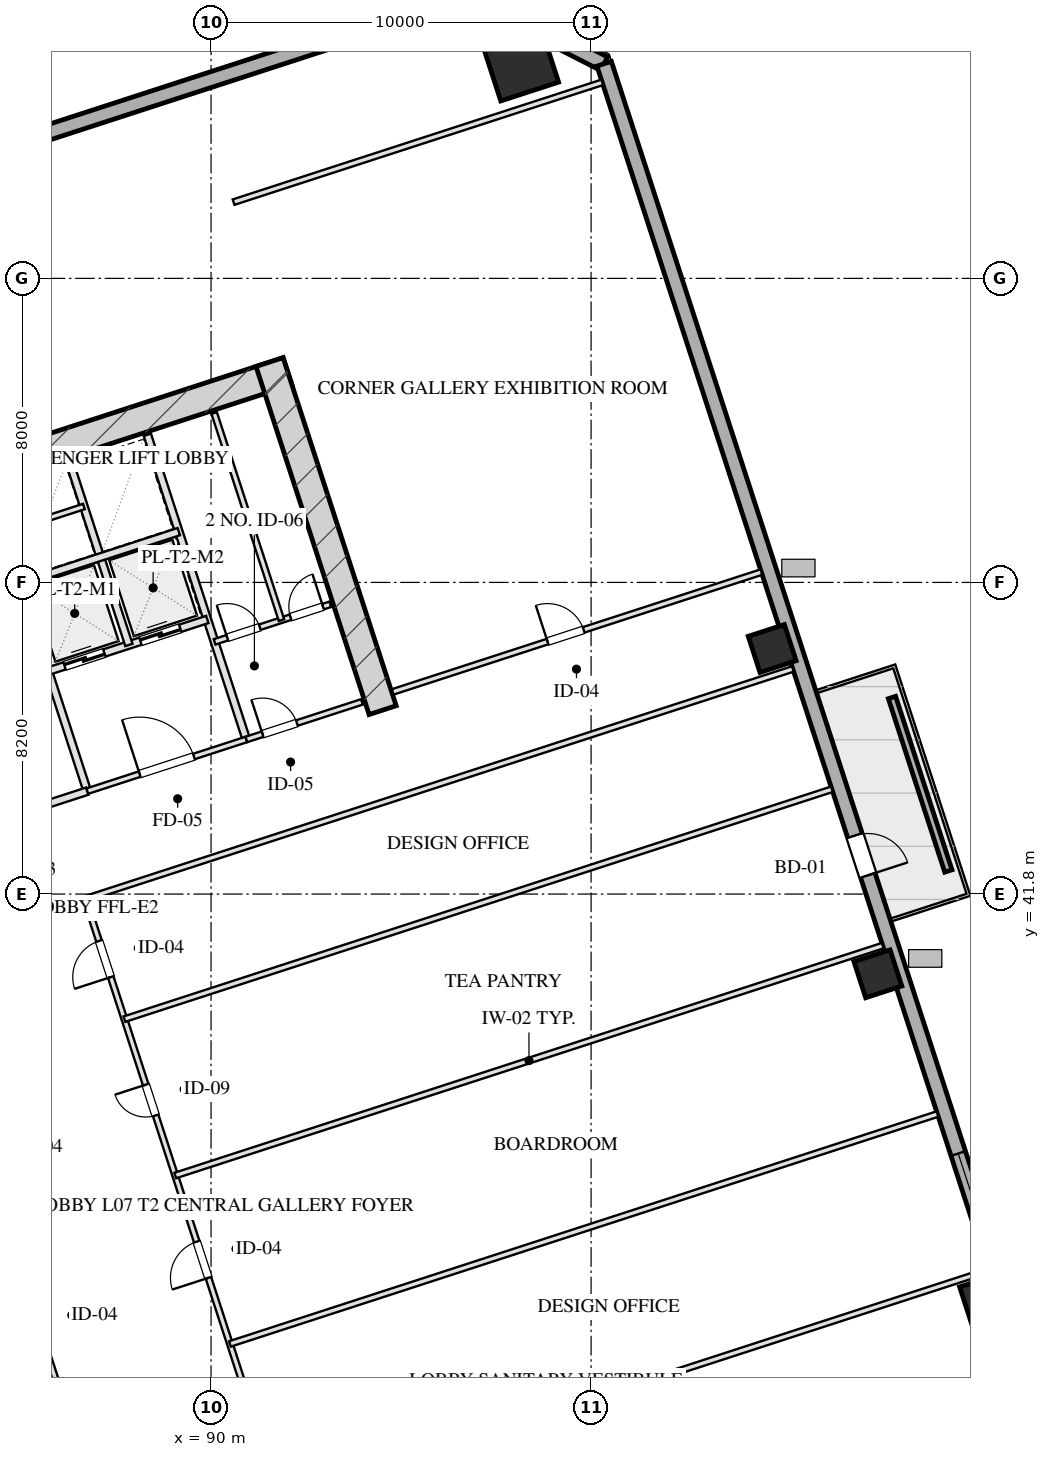
"""IFC4 building model, lengths in metres.
Left out: names, types, materials, properties, quantities, classifications, styles, units other than length and angle.
Written with IfcOpenShell. Run it as: python <this file> out.ifc"""

import sys

from ifc_helpers import new_model, si_unit, direction, frame, frame_2d, origin, origin_2d, place, context, subcontext, project, spatial, rectangle, hollow_rectangle, extrude, element, fill, save


model = new_model("IFC4")
c1 = context("Model", 3, precision=1e-05, world=origin(), true_north=direction((0.0, 1.0)))
c2 = subcontext(c1, "Body", "Model", "MODEL_VIEW")
j1 = project(units=[si_unit("LENGTHUNIT", "METRE"), si_unit("PLANEANGLEUNIT", "RADIAN")], contexts=[c1])
p1 = place(None, origin())
s1 = spatial("IfcSite", under=j1, at=p1, CompositionType="ELEMENT")
p2 = place(p1, origin())
s2 = spatial("IfcBuilding", under=s1, at=p2, CompositionType="ELEMENT")
p3 = place(p2, frame((0.0, 0.0, 34.0)))
s3 = spatial("IfcBuildingStorey", under=s2, at=p3, CompositionType="ELEMENT", Elevation=34.0)
p4 = place(p3, frame((76.272, 50.443, 0.0), z_axis=(0.0, 0.0, 1.0), x_axis=(0.951056072937, 0.309018358888, 0.0)))
e1 = element("IfcWall", 1, at=p4, inside=s3, PredefinedType="SHEAR", context=c2, shape_type="SweptSolid", body=[
    extrude(rectangle(XDim=16.55, YDim=0.75, at=frame_2d((8.275, 0.0))), origin(), (0.0, 0.0, 1.0), 4.0),
])
p5 = place(p3, frame((94.515, 46.639, 0.0), z_axis=(0.0, 0.0, 1.0), x_axis=(-0.309016134813, 0.951056795583, 0.0)))
e2 = element("IfcWall", 2, at=p5, inside=s3, PredefinedType="SHEAR", context=c2, shape_type="SweptSolid", body=[
    extrude(rectangle(XDim=9.63, YDim=0.75, at=frame_2d((4.815, 0.0))), origin(), (0.0, 0.0, 1.0), 4.0),
])
p6 = place(p3, frame((98.137, 63.677, 0.0), z_axis=(0.0, 0.0, 1.0), x_axis=(0.951056516295, 0.309016994375, 0.0)))
e3 = element("IfcColumn", 3, at=p6, inside=s3, PredefinedType="COLUMN", context=c2, shape_type="SweptSolid", body=[
    extrude(hollow_rectangle(XDim=1.6, YDim=1.6, WallThickness=0.055, at=origin_2d()), origin(), (0.0, 0.0, 1.0), 4.001),
])
for number, where, z_axis, x_axis in (
    (4, (110.328, 31.142, 0.0), (0.0, 0.0, 1.0), (0.951, 0.309, 0.0)),
    (5, (107.547, 39.701, 0.0), (0.0, 0.0, 1.0), (0.951, 0.309, 0.0)),
    (6, (104.766, 48.261, 0.0), (0.0, 0.0, 1.0), (0.951, 0.309, 0.0)),
):
    element("IfcColumn", number, at=place(p3, frame(where, z_axis=z_axis, x_axis=x_axis)), inside=s3, PredefinedType="COLUMN", context=c2, shape_type="SweptSolid", body=[
        extrude(hollow_rectangle(XDim=1.0, YDim=1.0, WallThickness=0.036, at=origin_2d()), origin(), (0.0, 0.0, 1.0), 4.001),
    ])
p7 = place(p3, frame((66.002, 55.433, 0.0), z_axis=(0.0, 0.0, 1.0), x_axis=(0.951055939317, 0.309018770125, 0.0)))
e7 = element("IfcWall", 7, at=p7, inside=s3, PredefinedType="SOLIDWALL", context=c2, shape_type="SweptSolid", body=[
    extrude(rectangle(XDim=32.4, YDim=0.4, at=frame_2d((16.2, 0.0))), origin(), (0.0, 0.0, 1.0), 3.16),
])
p8 = place(p3, frame((96.816, 65.446, 0.0), z_axis=(0.0, 0.0, 1.0), x_axis=(0.890998089617, -0.454007053137, 0.0)))
e8 = element("IfcWall", 8, at=p8, inside=s3, PredefinedType="SOLIDWALL", context=c2, shape_type="SweptSolid", body=[
    extrude(rectangle(XDim=3.96, YDim=0.4, at=frame_2d((1.98, 0.0))), origin(), (0.0, 0.0, 1.0), 3.16),
])
p9 = place(p3, frame((100.345, 63.648, 0.0), z_axis=(0.0, 0.0, 1.0), x_axis=(0.309014526607, -0.951057318118, 0.0)))
e9 = element("IfcWall", 9, at=p9, inside=s3, PredefinedType="SOLIDWALL", context=c2, shape_type="SweptSolid", body=[
    extrude(rectangle(XDim=50.0, YDim=0.4, at=frame_2d((25.0, 0.0))), origin(), (0.0, 0.0, 1.0), 3.16),
])
p10 = place(p9, frame((30.15, 0.0, 0.75)))
e10 = element("IfcOpeningElement", 10, at=p10, cuts=e9, PredefinedType="OPENING", context=c2, shape_type="SweptSolid", body=[
    extrude(rectangle(XDim=2.5, YDim=1.75, at=frame_2d((1.25, 0.875))), frame((0.0, 0.21, 0.0), z_axis=(0.0, -1.0, 0.0), x_axis=(1.0, 0.0, 0.0)), (0.0, 0.0, 1.0), 0.42),
])
p11 = place(p9, frame((21.354, 0.0, 0.0)))
e11 = element("IfcOpeningElement", 11, at=p11, cuts=e9, PredefinedType="OPENING", context=c2, shape_type="SweptSolid", body=[
    extrude(rectangle(XDim=1.1, YDim=2.15, at=frame_2d((0.55, 1.075))), frame((0.0, 0.21, 0.0), z_axis=(0.0, -1.0, 0.0), x_axis=(1.0, 0.0, 0.0)), (0.0, 0.0, 1.0), 0.42),
])
p12 = place(p3, frame((109.402, 42.407, 0.0), z_axis=(0.0, 0.0, 1.0), x_axis=(-0.30900096172, 0.951061725471, 0.0)))
e12 = element("IfcWall", 12, at=p12, inside=s3, PredefinedType="PARAPET", context=c2, shape_type="SweptSolid", body=[
    extrude(rectangle(XDim=4.8, YDim=0.2, at=frame_2d((2.4, 0.0))), origin(), (0.0, 0.0, 1.0), 0.75),
])
p13 = place(p3, frame((86.743, 44.508, 0.0), z_axis=(0.0, 0.0, 1.0), x_axis=(-0.309016001439, 0.951056838919, 0.0)))
e13 = element("IfcWall", 13, at=p13, inside=s3, PredefinedType="PARTITIONING", context=c2, shape_type="SweptSolid", body=[
    extrude(rectangle(XDim=8.43, YDim=0.2, at=frame_2d((4.215, 0.0))), origin(), (0.0, 0.0, 1.0), 3.725),
])
p14 = place(p3, frame((83.101, 43.324, 0.0), z_axis=(0.0, 0.0, 1.0), x_axis=(0.951052804469, 0.309028417967, 0.0)))
e14 = element("IfcWall", 14, at=p14, inside=s3, PredefinedType="PARTITIONING", context=c2, shape_type="SweptSolid", body=[
    extrude(rectangle(XDim=3.83, YDim=0.2, at=frame_2d((1.915, 0.0))), origin(), (0.0, 0.0, 1.0), 3.725),
])
p15 = place(p14, frame((1.35, 0.0, 0.0)))
e15 = element("IfcOpeningElement", 15, at=p15, cuts=e14, PredefinedType="OPENING", context=c2, shape_type="SweptSolid", body=[
    extrude(rectangle(XDim=1.2, YDim=2.05, at=frame_2d((0.6, 1.025))), frame((0.0, 0.11, 0.0), z_axis=(0.0, -1.0, 0.0), x_axis=(1.0, 0.0, 0.0)), (0.0, 0.0, 1.0), 0.22),
])
p16 = place(p3, frame((90.928, 45.868, 0.0), z_axis=(0.0, 0.0, 1.0), x_axis=(-0.309042196757, 0.951048327176, 0.0)))
e16 = element("IfcWall", 16, at=p16, inside=s3, PredefinedType="PARTITIONING", context=c2, shape_type="SweptSolid", body=[
    extrude(rectangle(XDim=8.43, YDim=0.2, at=frame_2d((4.215, 0.0))), origin(), (0.0, 0.0, 1.0), 3.725),
])
p17 = place(p3, frame((86.743, 44.508, 0.0), z_axis=(0.0, 0.0, 1.0), x_axis=(0.951063829732, 0.308994485023, 0.0)))
e17 = element("IfcWall", 17, at=p17, inside=s3, PredefinedType="PARTITIONING", context=c2, shape_type="SweptSolid", body=[
    extrude(rectangle(XDim=4.4, YDim=0.15, at=frame_2d((2.2, 0.0))), origin(), (0.0, 0.0, 1.0), 3.725),
])
p18 = place(p17, frame((1.45, 0.0, 0.0)))
e18 = element("IfcOpeningElement", 18, at=p18, cuts=e17, PredefinedType="OPENING", context=c2, shape_type="SweptSolid", body=[
    extrude(rectangle(XDim=1.5, YDim=2.05, at=frame_2d((0.75, 1.025))), frame((0.0, 0.085, 0.0), z_axis=(0.0, -1.0, 0.0), x_axis=(1.0, 0.0, 0.0)), (0.0, 0.0, 1.0), 0.17),
])
p19 = place(p3, frame((85.718, 47.666, 0.0), z_axis=(0.0, 0.0, 1.0), x_axis=(0.951058531764, 0.30901079133, 0.0)))
e19 = element("IfcWall", 19, at=p19, inside=s3, PredefinedType="PARTITIONING", context=c2, shape_type="SweptSolid", body=[
    extrude(rectangle(XDim=4.4, YDim=0.2, at=frame_2d((2.2, 0.0))), origin(), (0.0, 0.0, 1.0), 3.725),
])
p20 = place(p19, frame((0.45, 0.0, 0.0)))
e20 = element("IfcOpeningElement", 20, at=p20, cuts=e19, PredefinedType="OPENING", context=c2, shape_type="SweptSolid", body=[
    extrude(rectangle(XDim=1.1, YDim=2.05, at=frame_2d((0.55, 1.025))), frame((0.0, 0.11, 0.0), z_axis=(0.0, -1.0, 0.0), x_axis=(1.0, 0.0, 0.0)), (0.0, 0.0, 1.0), 0.22),
])
p21 = place(p19, frame((2.55, 0.0, 0.0)))
e21 = element("IfcOpeningElement", 21, at=p21, cuts=e19, PredefinedType="OPENING", context=c2, shape_type="SweptSolid", body=[
    extrude(rectangle(XDim=1.1, YDim=2.05, at=frame_2d((0.55, 1.025))), frame((0.0, 0.11, 0.0), z_axis=(0.0, -1.0, 0.0), x_axis=(1.0, 0.0, 0.0)), (0.0, 0.0, 1.0), 0.22),
])
p22 = place(p3, frame((87.838, 48.354, 0.0), z_axis=(0.0, 0.0, 1.0), x_axis=(-0.3090093719, 0.951058992953, 0.0)))
e22 = element("IfcWall", 22, at=p22, inside=s3, PredefinedType="PARTITIONING", context=c2, shape_type="SweptSolid", body=[
    extrude(rectangle(XDim=5.11, YDim=0.2, at=frame_2d((2.555, 0.0))), origin(), (0.0, 0.0, 1.0), 3.725),
])
p23 = place(p3, frame((84.967, 49.977, 0.0), z_axis=(0.0, 0.0, 1.0), x_axis=(0.951063829732, 0.308994485023, 0.0)))
e23 = element("IfcWall", 23, at=p23, inside=s3, PredefinedType="PARTITIONING", context=c2, shape_type="SweptSolid", body=[
    extrude(rectangle(XDim=4.4, YDim=0.2, at=frame_2d((2.2, 0.0))), origin(), (0.0, 0.0, 1.0), 3.725),
])
p24 = place(p3, frame((84.534, 51.308, 0.0), z_axis=(0.0, 0.0, 1.0), x_axis=(0.951075093106, 0.308959814982, 0.0)))
e24 = element("IfcWall", 24, at=p24, inside=s3, PredefinedType="PARTITIONING", context=c2, shape_type="SweptSolid", body=[
    extrude(rectangle(XDim=2.23, YDim=0.15, at=frame_2d((1.115, 0.0))), origin(), (0.0, 0.0, 1.0), 3.725),
])
p25 = place(p3, frame((90.928, 45.868, 0.0), z_axis=(0.0, 0.0, 1.0), x_axis=(0.951059297078, 0.309008435874, 0.0)))
e25 = element("IfcWall", 25, at=p25, inside=s3, PredefinedType="PARTITIONING", context=c2, shape_type="SweptSolid", body=[
    extrude(rectangle(XDim=3.2, YDim=0.15, at=frame_2d((1.6, 0.0))), origin(), (0.0, 0.0, 1.0), 3.725),
])
p26 = place(p25, frame((0.45, 0.0, 0.0)))
e26 = element("IfcOpeningElement", 26, at=p26, cuts=e25, PredefinedType="OPENING", context=c2, shape_type="SweptSolid", body=[
    extrude(rectangle(XDim=0.95, YDim=2.05, at=frame_2d((0.475, 1.025))), frame((0.0, 0.085, 0.0), z_axis=(0.0, -1.0, 0.0), x_axis=(1.0, 0.0, 0.0)), (0.0, 0.0, 1.0), 0.17),
])
p27 = place(p3, frame((90.094, 48.436, 0.0), z_axis=(0.0, 0.0, 1.0), x_axis=(0.951066581729, 0.308986014439, 0.0)))
e27 = element("IfcWall", 27, at=p27, inside=s3, PredefinedType="PARTITIONING", context=c2, shape_type="SweptSolid", body=[
    extrude(rectangle(XDim=3.2, YDim=0.15, at=frame_2d((1.6, 0.0))), origin(), (0.0, 0.0, 1.0), 3.725),
])
p28 = place(p27, frame((0.35, 0.0, 0.0)))
e28 = element("IfcOpeningElement", 28, at=p28, cuts=e27, PredefinedType="OPENING", context=c2, shape_type="SweptSolid", body=[
    extrude(rectangle(XDim=0.9, YDim=2.05, at=frame_2d((0.45, 1.025))), frame((0.0, 0.085, 0.0), z_axis=(0.0, -1.0, 0.0), x_axis=(1.0, 0.0, 0.0)), (0.0, 0.0, 1.0), 0.17),
])
p29 = place(p27, frame((2.1, 0.0, 0.0)))
e29 = element("IfcOpeningElement", 29, at=p29, cuts=e27, PredefinedType="OPENING", context=c2, shape_type="SweptSolid", body=[
    extrude(rectangle(XDim=0.9, YDim=2.05, at=frame_2d((0.45, 1.025))), frame((0.0, 0.085, 0.0), z_axis=(0.0, -1.0, 0.0), x_axis=(1.0, 0.0, 0.0)), (0.0, 0.0, 1.0), 0.17),
])
p30 = place(p3, frame((91.853, 49.007, 0.0), z_axis=(0.0, 0.0, 1.0), x_axis=(-0.309022487551, 0.951054731437, 0.0)))
e30 = element("IfcWall", 30, at=p30, inside=s3, PredefinedType="PARTITIONING", context=c2, shape_type="SweptSolid", body=[
    extrude(rectangle(XDim=5.73, YDim=0.15, at=frame_2d((2.865, 0.0))), origin(), (0.0, 0.0, 1.0), 3.725),
])
p31 = place(p3, frame((101.578, 26.196, 0.0), z_axis=(0.0, 0.0, 1.0), x_axis=(0.951059043131, 0.309009217467, 0.0)))
e31 = element("IfcWall", 31, at=p31, inside=s3, PredefinedType="PARTITIONING", context=c2, shape_type="SweptSolid", body=[
    extrude(rectangle(XDim=10.2, YDim=0.15, at=frame_2d((5.1, 0.0))), origin(), (0.0, 0.0, 1.0), 3.725),
])
p32 = place(p31, frame((4.284, 0.0, 0.0)))
e32 = element("IfcOpeningElement", 32, at=p32, cuts=e31, PredefinedType="OPENING", context=c2, shape_type="SweptSolid", body=[
    extrude(rectangle(XDim=1.0, YDim=2.05, at=frame_2d((0.5, 1.025))), frame((0.0, 0.085, 0.0), z_axis=(0.0, -1.0, 0.0), x_axis=(1.0, 0.0, 0.0)), (0.0, 0.0, 1.0), 0.17),
])
p33 = place(p3, frame((90.593, 60.006, 0.0), z_axis=(0.0, 0.0, 1.0), x_axis=(0.951059043131, 0.309009217467, 0.0)))
e33 = element("IfcWall", 33, at=p33, inside=s3, PredefinedType="PARTITIONING", context=c2, shape_type="SweptSolid", body=[
    extrude(rectangle(XDim=10.2, YDim=0.15, at=frame_2d((5.1, 0.0))), origin(), (0.0, 0.0, 1.0), 3.725),
])
p34 = place(p3, frame((94.78, 47.119, 0.0), z_axis=(0.0, 0.0, 1.0), x_axis=(0.951054294345, 0.309023832749, 0.0)))
e34 = element("IfcWall", 34, at=p34, inside=s3, PredefinedType="PARTITIONING", context=c2, shape_type="SweptSolid", body=[
    extrude(rectangle(XDim=10.2, YDim=0.15, at=frame_2d((5.1, 0.0))), origin(), (0.0, 0.0, 1.0), 3.725),
])
p35 = place(p34, frame((4.284, 0.0, 0.0)))
e35 = element("IfcOpeningElement", 35, at=p35, cuts=e34, PredefinedType="OPENING", context=c2, shape_type="SweptSolid", body=[
    extrude(rectangle(XDim=1.0, YDim=2.05, at=frame_2d((0.5, 1.025))), frame((0.0, 0.085, 0.0), z_axis=(0.0, -1.0, 0.0), x_axis=(1.0, 0.0, 0.0)), (0.0, 0.0, 1.0), 0.17),
])
for number, where, z_axis, x_axis in (
    (36, (91.834, 25.848, 0.0), (0.0, 0.0, 1.0), (0.951, 0.309, 0.0)),
    (37, (86.692, 41.673, 0.0), (0.0, 0.0, 1.0), (0.951, 0.309, 0.0)),
):
    element("IfcWall", number, at=place(p3, frame(where, z_axis=z_axis, x_axis=x_axis)), inside=s3, PredefinedType="PARTITIONING", context=c2, shape_type="SweptSolid", body=[
        extrude(rectangle(XDim=19.575, YDim=0.15, at=frame_2d((9.788, 0.0))), origin(), (0.0, 0.0, 1.0), 3.725),
    ])
p36 = place(p3, frame((87.412, 24.411, 0.0), z_axis=(0.0, 0.0, 1.0), x_axis=(-0.309022042254, 0.951054876125, 0.0)))
e38 = element("IfcWall", 38, at=p36, inside=s3, PredefinedType="PARTITIONING", context=c2, shape_type="SweptSolid", body=[
    extrude(rectangle(XDim=16.64, YDim=0.15, at=frame_2d((8.32, 0.0))), origin(), (0.0, 0.0, 1.0), 3.725),
])
p37 = place(p36, frame((1.33, 0.0, 0.0)))
e39 = element("IfcOpeningElement", 39, at=p37, cuts=e38, PredefinedType="OPENING", context=c2, shape_type="SweptSolid", body=[
    extrude(rectangle(XDim=1.0, YDim=2.05, at=frame_2d((0.5, 1.025))), frame((0.0, 0.085, 0.0), z_axis=(0.0, -1.0, 0.0), x_axis=(1.0, 0.0, 0.0)), (0.0, 0.0, 1.0), 0.17),
])
p38 = place(p36, frame((5.83, 0.0, 0.0)))
e40 = element("IfcOpeningElement", 40, at=p38, cuts=e38, PredefinedType="OPENING", context=c2, shape_type="SweptSolid", body=[
    extrude(rectangle(XDim=1.0, YDim=2.05, at=frame_2d((0.5, 1.025))), frame((0.0, 0.085, 0.0), z_axis=(0.0, -1.0, 0.0), x_axis=(1.0, 0.0, 0.0)), (0.0, 0.0, 1.0), 0.17),
])
p39 = place(p36, frame((10.49, 0.0, 0.0)))
e41 = element("IfcOpeningElement", 41, at=p39, cuts=e38, PredefinedType="OPENING", context=c2, shape_type="SweptSolid", body=[
    extrude(rectangle(XDim=1.0, YDim=2.05, at=frame_2d((0.5, 1.025))), frame((0.0, 0.085, 0.0), z_axis=(0.0, -1.0, 0.0), x_axis=(1.0, 0.0, 0.0)), (0.0, 0.0, 1.0), 0.17),
])
p40 = place(p36, frame((14.31, 0.0, 0.0)))
e42 = element("IfcOpeningElement", 42, at=p40, cuts=e38, PredefinedType="OPENING", context=c2, shape_type="SweptSolid", body=[
    extrude(rectangle(XDim=1.05, YDim=2.05, at=frame_2d((0.525, 1.025))), frame((0.0, 0.085, 0.0), z_axis=(0.0, -1.0, 0.0), x_axis=(1.0, 0.0, 0.0)), (0.0, 0.0, 1.0), 0.17),
])
p41 = place(p3, frame((91.834, 25.848, 0.0), z_axis=(0.0, 0.0, 1.0), x_axis=(-0.30901773025, 0.951056277195, 0.0)))
e43 = element("IfcWall", 43, at=p41, inside=s3, PredefinedType="PARTITIONING", context=c2, shape_type="SweptSolid", body=[
    extrude(rectangle(XDim=16.64, YDim=0.15, at=frame_2d((8.32, 0.0))), origin(), (0.0, 0.0, 1.0), 3.725),
])
p42 = place(p41, frame((1.663, 0.0, 0.0)))
e44 = element("IfcOpeningElement", 44, at=p42, cuts=e43, PredefinedType="OPENING", context=c2, shape_type="SweptSolid", body=[
    extrude(rectangle(XDim=1.0, YDim=2.05, at=frame_2d((0.5, 1.025))), frame((0.0, 0.085, 0.0), z_axis=(0.0, -1.0, 0.0), x_axis=(1.0, 0.0, 0.0)), (0.0, 0.0, 1.0), 0.17),
])
p43 = place(p41, frame((6.156, 0.0, 0.0)))
e45 = element("IfcOpeningElement", 45, at=p43, cuts=e43, PredefinedType="OPENING", context=c2, shape_type="SweptSolid", body=[
    extrude(rectangle(XDim=1.0, YDim=2.05, at=frame_2d((0.5, 1.025))), frame((0.0, 0.085, 0.0), z_axis=(0.0, -1.0, 0.0), x_axis=(1.0, 0.0, 0.0)), (0.0, 0.0, 1.0), 0.17),
])
p44 = place(p41, frame((10.649, 0.0, 0.0)))
e46 = element("IfcOpeningElement", 46, at=p44, cuts=e43, PredefinedType="OPENING", context=c2, shape_type="SweptSolid", body=[
    extrude(rectangle(XDim=0.85, YDim=2.05, at=frame_2d((0.425, 1.025))), frame((0.0, 0.085, 0.0), z_axis=(0.0, -1.0, 0.0), x_axis=(1.0, 0.0, 0.0)), (0.0, 0.0, 1.0), 0.17),
])
p45 = place(p41, frame((14.476, 0.0, 0.0)))
e47 = element("IfcOpeningElement", 47, at=p45, cuts=e43, PredefinedType="OPENING", context=c2, shape_type="SweptSolid", body=[
    extrude(rectangle(XDim=1.0, YDim=2.05, at=frame_2d((0.5, 1.025))), frame((0.0, 0.085, 0.0), z_axis=(0.0, -1.0, 0.0), x_axis=(1.0, 0.0, 0.0)), (0.0, 0.0, 1.0), 0.17),
])
for number, where, z_axis, x_axis in (
    (48, (90.497, 29.962, 0.0), (0.0, 0.0, 1.0), (0.951, 0.309, 0.0)),
    (49, (89.057, 34.394, 0.0), (0.0, 0.0, 1.0), (0.951, 0.309, 0.0)),
    (50, (87.72, 38.508, 0.0), (0.0, 0.0, 1.0), (0.951, 0.309, 0.0)),
):
    element("IfcWall", number, at=place(p3, frame(where, z_axis=z_axis, x_axis=x_axis)), inside=s3, PredefinedType="PARTITIONING", context=c2, shape_type="SweptSolid", body=[
        extrude(rectangle(XDim=19.575, YDim=0.15, at=frame_2d((9.788, 0.0))), origin(), (0.0, 0.0, 1.0), 3.725),
    ])
p46 = place(p10, origin())
e51 = element("IfcWindow", 51, at=p46, inside=s3, PartitioningType="TRIPLE_PANEL_VERTICAL", PredefinedType="WINDOW", context=c2, shape_type="SweptSolid", body=[
    extrude(rectangle(XDim=2.5, YDim=1.75, at=frame_2d((1.25, 0.875))), frame((0.0, 0.03, 0.0), z_axis=(0.0, -1.0, 0.0), x_axis=(1.0, 0.0, 0.0)), (0.0, 0.0, 1.0), 0.06),
])
fill(e10, e51)
p47 = place(p11, origin())
e52 = element("IfcDoor", 52, at=p47, inside=s3, OperationType="SINGLE_SWING_RIGHT", PredefinedType="DOOR", context=c2, shape_type="SweptSolid", body=[
    extrude(rectangle(XDim=1.1, YDim=2.15, at=frame_2d((0.55, 1.075))), frame((0.0, 0.025, 0.0), z_axis=(0.0, -1.0, 0.0), x_axis=(1.0, 0.0, 0.0)), (0.0, 0.0, 1.0), 0.05),
])
fill(e11, e52)
p48 = place(p18, origin())
e53 = element("IfcDoor", 53, at=p48, inside=s3, OperationType="SINGLE_SWING_LEFT", PredefinedType="DOOR", context=c2, shape_type="SweptSolid", body=[
    extrude(rectangle(XDim=1.5, YDim=2.05, at=frame_2d((0.75, 1.025))), frame((0.0, 0.025, 0.0), z_axis=(0.0, -1.0, 0.0), x_axis=(1.0, 0.0, 0.0)), (0.0, 0.0, 1.0), 0.05),
])
fill(e18, e53)
p49 = place(p20, origin())
e54 = element("IfcDoor", 54, at=p49, inside=s3, OperationType="DOUBLE_DOOR_SLIDING", PredefinedType="DOOR", context=c2, shape_type="SweptSolid", body=[
    extrude(rectangle(XDim=1.1, YDim=2.05, at=frame_2d((0.55, 1.025))), frame((0.0, 0.025, 0.0), z_axis=(0.0, -1.0, 0.0), x_axis=(1.0, 0.0, 0.0)), (0.0, 0.0, 1.0), 0.05),
])
fill(e20, e54)
p50 = place(p21, origin())
e55 = element("IfcDoor", 55, at=p50, inside=s3, OperationType="DOUBLE_DOOR_SLIDING", PredefinedType="DOOR", context=c2, shape_type="SweptSolid", body=[
    extrude(rectangle(XDim=1.1, YDim=2.05, at=frame_2d((0.55, 1.025))), frame((0.0, 0.025, 0.0), z_axis=(0.0, -1.0, 0.0), x_axis=(1.0, 0.0, 0.0)), (0.0, 0.0, 1.0), 0.05),
])
fill(e21, e55)
p51 = place(p26, origin())
e56 = element("IfcDoor", 56, at=p51, inside=s3, OperationType="SINGLE_SWING_LEFT", PredefinedType="DOOR", context=c2, shape_type="SweptSolid", body=[
    extrude(rectangle(XDim=0.95, YDim=2.05, at=frame_2d((0.475, 1.025))), frame((0.0, 0.025, 0.0), z_axis=(0.0, -1.0, 0.0), x_axis=(1.0, 0.0, 0.0)), (0.0, 0.0, 1.0), 0.05),
])
fill(e26, e56)
p52 = place(p28, origin())
e57 = element("IfcDoor", 57, at=p52, inside=s3, OperationType="SINGLE_SWING_LEFT", PredefinedType="DOOR", context=c2, shape_type="SweptSolid", body=[
    extrude(rectangle(XDim=0.9, YDim=2.05, at=frame_2d((0.45, 1.025))), frame((0.0, 0.025, 0.0), z_axis=(0.0, -1.0, 0.0), x_axis=(1.0, 0.0, 0.0)), (0.0, 0.0, 1.0), 0.05),
])
fill(e28, e57)
p53 = place(p29, origin())
e58 = element("IfcDoor", 58, at=p53, inside=s3, OperationType="SINGLE_SWING_RIGHT", PredefinedType="DOOR", context=c2, shape_type="SweptSolid", body=[
    extrude(rectangle(XDim=0.9, YDim=2.05, at=frame_2d((0.45, 1.025))), frame((0.0, 0.025, 0.0), z_axis=(0.0, -1.0, 0.0), x_axis=(1.0, 0.0, 0.0)), (0.0, 0.0, 1.0), 0.05),
])
fill(e29, e58)
p54 = place(p35, origin())
e59 = element("IfcDoor", 59, at=p54, inside=s3, OperationType="SINGLE_SWING_LEFT", PredefinedType="DOOR", context=c2, shape_type="SweptSolid", body=[
    extrude(rectangle(XDim=1.0, YDim=2.05, at=frame_2d((0.5, 1.025))), frame((0.0, 0.025, 0.0), z_axis=(0.0, -1.0, 0.0), x_axis=(1.0, 0.0, 0.0)), (0.0, 0.0, 1.0), 0.05),
])
fill(e35, e59)
p55 = place(p43, origin())
e60 = element("IfcDoor", 60, at=p55, inside=s3, OperationType="SINGLE_SWING_LEFT", PredefinedType="DOOR", context=c2, shape_type="SweptSolid", body=[
    extrude(rectangle(XDim=1.0, YDim=2.05, at=frame_2d((0.5, 1.025))), frame((0.0, 0.025, 0.0), z_axis=(0.0, -1.0, 0.0), x_axis=(1.0, 0.0, 0.0)), (0.0, 0.0, 1.0), 0.05),
])
fill(e45, e60)
p56 = place(p44, origin())
e61 = element("IfcDoor", 61, at=p56, inside=s3, OperationType="SINGLE_SWING_RIGHT", PredefinedType="DOOR", context=c2, shape_type="SweptSolid", body=[
    extrude(rectangle(XDim=0.85, YDim=2.05, at=frame_2d((0.425, 1.025))), frame((0.0, 0.025, 0.0), z_axis=(0.0, -1.0, 0.0), x_axis=(1.0, 0.0, 0.0)), (0.0, 0.0, 1.0), 0.05),
])
fill(e46, e61)
p57 = place(p45, origin())
e62 = element("IfcDoor", 62, at=p57, inside=s3, OperationType="SINGLE_SWING_LEFT", PredefinedType="DOOR", context=c2, shape_type="SweptSolid", body=[
    extrude(rectangle(XDim=1.0, YDim=2.05, at=frame_2d((0.5, 1.025))), frame((0.0, 0.025, 0.0), z_axis=(0.0, -1.0, 0.0), x_axis=(1.0, 0.0, 0.0)), (0.0, 0.0, 1.0), 0.05),
])
fill(e47, e62)
save(model, sys.argv[1])
